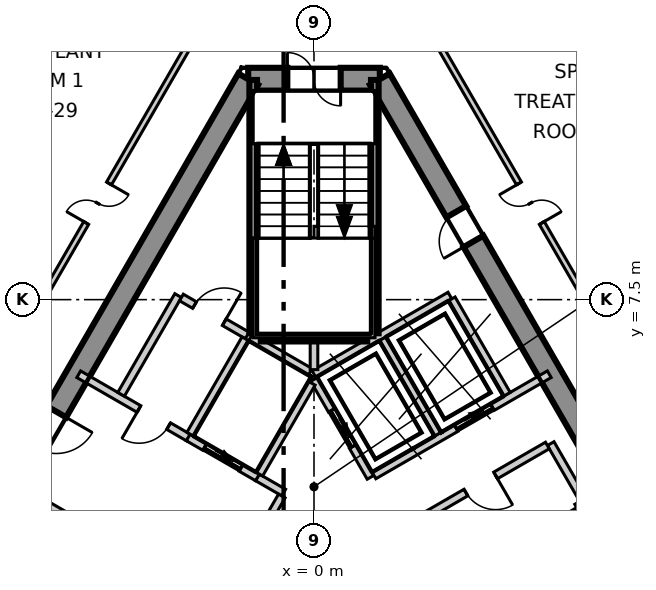
"""IFC4 building model, lengths in metres.
Left out: names, types, materials, properties, quantities, classifications, styles, units other than length and angle.
Written with IfcOpenShell. Run it as: python <this file> out.ifc"""

import sys

from ifc_helpers import new_model, si_unit, direction, frame, frame_2d, origin, place, context, subcontext, project, spatial, polyline, rectangle, outline, extrude, element, fill, save


model = new_model("IFC4")
c1 = context("Model", 3, precision=1e-05, world=origin(), true_north=direction((0.0, 1.0)))
c2 = subcontext(c1, "Body", "Model", "MODEL_VIEW")
j1 = project(units=[si_unit("LENGTHUNIT", "METRE"), si_unit("PLANEANGLEUNIT", "RADIAN")], contexts=[c1])
p1 = place(None, origin())
s1 = spatial("IfcSite", under=j1, at=p1, CompositionType="ELEMENT")
p2 = place(p1, origin())
s2 = spatial("IfcBuilding", under=s1, at=p2, CompositionType="ELEMENT")
p3 = place(p2, frame((0.0, 0.0, 322.3)))
s3 = spatial("IfcBuildingStorey", under=s2, at=p3, CompositionType="ELEMENT", Elevation=322.3)
p4 = place(p3, frame((1.732, 13.3, -0.3), z_axis=(0.0, 0.0, 1.0), x_axis=(-1.0, 0.0, 0.0)))
e1 = element("IfcWall", 1, at=p4, inside=s3, PredefinedType="SHEAR", context=c2, shape_type="SweptSolid", body=[
    extrude(outline(polyline([(-0.173, -0.3), (1.732, -0.3), (3.637, -0.3), (3.291, 0.3), (1.732, 0.3), (0.173, 0.3), (-0.173, -0.3)])), origin(), (0.0, 0.0, 1.0), 5.35),
])
p5 = place(p4, frame((1.032, 0.0, 0.3)))
e2 = element("IfcOpeningElement", 2, at=p5, cuts=e1, PredefinedType="OPENING", context=c2, shape_type="SweptSolid", body=[
    extrude(rectangle(XDim=1.4, YDim=2.1, at=frame_2d((0.7, 1.05))), frame((0.0, 0.31, 0.0), z_axis=(0.0, -1.0, 0.0), x_axis=(1.0, 0.0, 0.0)), (0.0, 0.0, 1.0), 0.62),
])
p6 = place(p3, frame((-1.732, 13.3, -0.3), z_axis=(0.0, 0.0, 1.0), x_axis=(-0.500000539815, -0.866025092122, 0.0)))
e3 = element("IfcWall", 3, at=p6, inside=s3, PredefinedType="SHEAR", context=c2, shape_type="SweptSolid", body=[
    extrude(outline(polyline([(-0.173, -0.3), (1.795, -0.3), (3.763, -0.3), (5.732, -0.3), (7.7, -0.3), (9.668, -0.301), (11.637, -0.301), (13.605, -0.301), (15.573, -0.301), (17.542, -0.301), (19.51, -0.301), (21.478, -0.301), (21.131, 0.3), (19.226, 0.3), (17.321, 0.3), (15.415, 0.3), (13.51, 0.3), (11.605, 0.3), (9.699, 0.3), (7.794, 0.3), (5.889, 0.3), (3.984, 0.3), (2.078, 0.3), (0.173, 0.3), (-0.173, -0.3)])), origin(), (0.0, 0.0, 1.0), 5.35),
])
p7 = place(p6, frame((10.102, 0.0, 0.3)))
e4 = element("IfcOpeningElement", 4, at=p7, cuts=e3, PredefinedType="OPENING", context=c2, shape_type="SweptSolid", body=[
    extrude(rectangle(XDim=1.1, YDim=2.1, at=frame_2d((0.55, 1.05))), frame((0.0, 0.31, 0.0), z_axis=(0.0, -1.0, 0.0), x_axis=(1.0, 0.0, 0.0)), (0.0, 0.0, 1.0), 0.621),
])
p8 = place(p6, frame((16.378, 0.0, 0.3)))
e5 = element("IfcOpeningElement", 5, at=p8, cuts=e3, PredefinedType="OPENING", context=c2, shape_type="SweptSolid", body=[
    extrude(rectangle(XDim=0.9, YDim=2.1, at=frame_2d((0.45, 1.05))), frame((0.0, 0.31, 0.0), z_axis=(0.0, -1.0, 0.0), x_axis=(1.0, 0.0, 0.0)), (0.0, 0.0, 1.0), 0.621),
])
p9 = place(p3, frame((12.384, -5.15, -0.3), z_axis=(0.0, 0.0, 1.0), x_axis=(-0.500000539815, 0.866025092122, 0.0)))
e6 = element("IfcWall", 6, at=p9, inside=s3, PredefinedType="SHEAR", context=c2, shape_type="SweptSolid", body=[
    extrude(outline(polyline([(-0.173, -0.301), (1.795, -0.301), (3.763, -0.301), (5.731, -0.301), (7.7, -0.301), (9.668, -0.301), (11.636, -0.301), (13.604, -0.3), (15.573, -0.3), (17.541, -0.3), (19.509, -0.3), (21.477, -0.3), (21.131, 0.3), (19.226, 0.3), (17.321, 0.3), (15.415, 0.3), (13.51, 0.3), (11.605, 0.3), (9.699, 0.3), (7.794, 0.3), (5.889, 0.3), (3.984, 0.3), (2.078, 0.3), (0.173, 0.3), (-0.173, -0.301)])), origin(), (0.0, 0.0, 1.0), 5.35),
])
p10 = place(p9, frame((16.378, 0.0, 0.3)))
e7 = element("IfcOpeningElement", 7, at=p10, cuts=e6, PredefinedType="OPENING", context=c2, shape_type="SweptSolid", body=[
    extrude(rectangle(XDim=0.9, YDim=2.1, at=frame_2d((0.45, 1.05))), frame((0.0, 0.31, 0.0), z_axis=(0.0, -1.0, 0.0), x_axis=(1.0, 0.0, 0.0)), (0.0, 0.0, 1.0), 0.621),
])
p11 = place(p3, frame((-8.579, 5.04, 0.0), z_axis=(0.0, 0.0, 1.0), x_axis=(0.499960750514, 0.8660480633, 0.0)))
e8 = element("IfcWall", 8, at=p11, inside=s3, PredefinedType="PARTITIONING", context=c2, shape_type="SweptSolid", body=[
    extrude(rectangle(XDim=11.529, YDim=0.15, at=frame_2d((5.765, 0.0))), origin(), (0.0, 0.0, 1.0), 5.05),
])
p12 = place(p11, frame((5.17, 0.0, 0.0)))
e9 = element("IfcOpeningElement", 9, at=p12, cuts=e8, PredefinedType="OPENING", context=c2, shape_type="SweptSolid", body=[
    extrude(rectangle(XDim=1.2, YDim=2.1, at=frame_2d((0.6, 1.05))), frame((0.0, 0.085, 0.0), z_axis=(0.0, -1.0, 0.0), x_axis=(1.0, 0.0, 0.0)), (0.0, 0.0, 1.0), 0.17),
])
p13 = place(p3, frame((2.771, 15.1, 0.0), z_axis=(0.0, 0.0, 1.0), x_axis=(0.500017691629, -0.866015189277, 0.0)))
e10 = element("IfcWall", 10, at=p13, inside=s3, PredefinedType="PARTITIONING", context=c2, shape_type="SweptSolid", body=[
    extrude(rectangle(XDim=23.383, YDim=0.15, at=frame_2d((11.691, 0.0))), origin(), (0.0, 0.0, 1.0), 5.05),
])
p14 = place(p13, frame((14.841, 0.0, 0.0)))
e11 = element("IfcOpeningElement", 11, at=p14, cuts=e10, PredefinedType="OPENING", context=c2, shape_type="SweptSolid", body=[
    extrude(rectangle(XDim=1.0, YDim=2.1, at=frame_2d((0.5, 1.05))), frame((0.0, 0.085, 0.0), z_axis=(0.0, -1.0, 0.0), x_axis=(1.0, 0.0, 0.0)), (0.0, 0.0, 1.0), 0.17),
])
p15 = place(p13, frame((5.246, 0.0, 0.0)))
e12 = element("IfcOpeningElement", 12, at=p15, cuts=e10, PredefinedType="OPENING", context=c2, shape_type="SweptSolid", body=[
    extrude(rectangle(XDim=1.2, YDim=2.1, at=frame_2d((0.6, 1.05))), frame((0.0, 0.085, 0.0), z_axis=(0.0, -1.0, 0.0), x_axis=(1.0, 0.0, 0.0)), (0.0, 0.0, 1.0), 0.17),
])
p16 = place(p3, frame((-0.002, 5.542, 0.0), z_axis=(0.0, 0.0, 1.0), x_axis=(0.866103910842, 0.499863997127, 0.0)))
e13 = element("IfcWall", 13, at=p16, inside=s3, PredefinedType="SOLIDWALL", context=c2, shape_type="SweptSolid", body=[
    extrude(rectangle(XDim=4.131, YDim=0.2, at=frame_2d((2.065, 0.0))), origin(), (0.0, 0.0, 1.0), 5.05),
])
p17 = place(p3, frame((0.0, 5.4, 0.0), z_axis=(0.0, 0.0, 1.0), x_axis=(0.500103862429, -0.865965430478, 0.0)))
e14 = element("IfcWall", 14, at=p17, inside=s3, PredefinedType="SOLIDWALL", context=c2, shape_type="SweptSolid", body=[
    extrude(rectangle(XDim=2.973, YDim=0.2, at=frame_2d((1.487, 0.0))), origin(), (0.0, 0.0, 1.0), 5.05),
])
p18 = place(p17, frame((0.937, 0.0, 0.0)))
e15 = element("IfcOpeningElement", 15, at=p18, cuts=e14, PredefinedType="OPENING", context=c2, shape_type="SweptSolid", body=[
    extrude(rectangle(XDim=1.1, YDim=2.1, at=frame_2d((0.55, 1.05))), frame((0.0, 0.11, 0.0), z_axis=(0.0, -1.0, 0.0), x_axis=(1.0, 0.0, 0.0)), (0.0, 0.0, 1.0), 0.22),
])
p19 = place(p3, frame((1.578, 2.874, 0.0), z_axis=(0.0, 0.0, 1.0), x_axis=(0.866045911672, 0.499964477614, 0.0)))
e16 = element("IfcWall", 16, at=p19, inside=s3, PredefinedType="SOLIDWALL", context=c2, shape_type="SweptSolid", body=[
    extrude(rectangle(XDim=5.327, YDim=0.2, at=frame_2d((2.663, 0.0))), origin(), (0.0, 0.0, 1.0), 5.05),
])
p20 = place(p19, frame((2.496, 0.0, 0.0)))
e17 = element("IfcOpeningElement", 17, at=p20, cuts=e16, PredefinedType="OPENING", context=c2, shape_type="SweptSolid", body=[
    extrude(rectangle(XDim=1.1, YDim=2.1, at=frame_2d((0.55, 1.05))), frame((0.0, 0.11, 0.0), z_axis=(0.0, -1.0, 0.0), x_axis=(1.0, 0.0, 0.0)), (0.0, 0.0, 1.0), 0.22),
])
for number, where, z_axis, x_axis in (
    (18, (3.626, 7.52, 0.0), (0.0, 0.0, 1.0), (0.5, -0.866, 0.0)),
    (19, (1.807, 6.47, 0.0), (0.0, 0.0, 1.0), (0.5, -0.866, 0.0)),
):
    element("IfcWall", number, at=place(p3, frame(where, z_axis=z_axis, x_axis=x_axis)), inside=s3, PredefinedType="SOLIDWALL", context=c2, shape_type="SweptSolid", body=[
        extrude(rectangle(XDim=2.9, YDim=0.2, at=frame_2d((1.45, 0.0))), origin(), (0.0, 0.0, 1.0), 5.05),
    ])
p21 = place(p3, frame((6.229, 3.712, 0.0), z_axis=(0.0, 0.0, 1.0), x_axis=(0.499875724984, -0.86609714211, 0.0)))
e20 = element("IfcWall", 20, at=p21, inside=s3, PredefinedType="SOLIDWALL", context=c2, shape_type="SweptSolid", body=[
    extrude(rectangle(XDim=1.701, YDim=0.2, at=frame_2d((0.85, 0.0))), origin(), (0.0, 0.0, 1.0), 5.05),
])
p22 = place(p3, frame((2.548, 1.587, 0.0), z_axis=(0.0, 0.0, 1.0), x_axis=(0.866004344652, 0.500036473714, 0.0)))
e21 = element("IfcWall", 21, at=p22, inside=s3, PredefinedType="SOLIDWALL", context=c2, shape_type="SweptSolid", body=[
    extrude(rectangle(XDim=4.15, YDim=0.2, at=frame_2d((2.075, 0.0))), origin(), (0.0, 0.0, 1.0), 5.05),
])
p23 = place(p22, frame((1.675, 0.0, 0.0)))
e22 = element("IfcOpeningElement", 22, at=p23, cuts=e21, PredefinedType="OPENING", context=c2, shape_type="SweptSolid", body=[
    extrude(rectangle(XDim=0.9, YDim=2.1, at=frame_2d((0.45, 1.05))), frame((0.0, 0.11, 0.0), z_axis=(0.0, -1.0, 0.0), x_axis=(1.0, 0.0, 0.0)), (0.0, 0.0, 1.0), 0.22),
])
p24 = place(p3, frame((-7.891, 2.593, 0.0), z_axis=(0.0, 0.0, 1.0), x_axis=(0.866070917804, -0.499921159118, 0.0)))
e23 = element("IfcWall", 23, at=p24, inside=s3, PredefinedType="SOLIDWALL", context=c2, shape_type="SweptSolid", body=[
    extrude(rectangle(XDim=3.333, YDim=0.2, at=frame_2d((1.666, 0.0))), origin(), (0.0, 0.0, 1.0), 5.05),
])
p25 = place(p24, frame((1.73, 0.0, 0.0)))
e24 = element("IfcOpeningElement", 24, at=p25, cuts=e23, PredefinedType="OPENING", context=c2, shape_type="SweptSolid", body=[
    extrude(rectangle(XDim=1.1, YDim=2.1, at=frame_2d((0.55, 1.05))), frame((0.0, 0.11, 0.0), z_axis=(0.0, -1.0, 0.0), x_axis=(1.0, 0.0, 0.0)), (0.0, 0.0, 1.0), 0.22),
])
p26 = place(p3, frame((-6.191, 5.537, 0.0), z_axis=(0.0, 0.0, 1.0), x_axis=(0.866052607023, -0.499952879648, 0.0)))
e25 = element("IfcWall", 25, at=p26, inside=s3, PredefinedType="SOLIDWALL", context=c2, shape_type="SweptSolid", body=[
    extrude(rectangle(XDim=3.332, YDim=0.2, at=frame_2d((1.666, 0.0))), origin(), (0.0, 0.0, 1.0), 5.05),
])
p27 = place(p26, frame((1.83, 0.0, 0.0)))
e26 = element("IfcOpeningElement", 26, at=p27, cuts=e25, PredefinedType="OPENING", context=c2, shape_type="SweptSolid", body=[
    extrude(rectangle(XDim=0.9, YDim=2.1, at=frame_2d((0.45, 1.05))), frame((0.0, 0.11, 0.0), z_axis=(0.0, -1.0, 0.0), x_axis=(1.0, 0.0, 0.0)), (0.0, 0.0, 1.0), 0.22),
])
p28 = place(p3, frame((-1.488, 2.822, 0.0), z_axis=(0.0, 0.0, 1.0), x_axis=(0.866236612152, -0.499633997809, 0.0)))
e27 = element("IfcWall", 27, at=p28, inside=s3, PredefinedType="SOLIDWALL", context=c2, shape_type="SweptSolid", body=[
    extrude(rectangle(XDim=0.796, YDim=0.2, at=frame_2d((0.398, 0.0))), origin(), (0.0, 0.0, 1.0), 5.05),
])
p29 = place(p3, frame((-5.076, 5.009, 0.0), z_axis=(0.0, 0.0, 1.0), x_axis=(0.50002537861, 0.866010750942, 0.0)))
e28 = element("IfcWall", 28, at=p29, inside=s3, PredefinedType="SOLIDWALL", context=c2, shape_type="SweptSolid", body=[
    extrude(rectangle(XDim=3.0, YDim=0.2, at=frame_2d((1.5, 0.0))), origin(), (0.0, 0.0, 1.0), 5.05),
])
p30 = place(p3, frame((-3.489, 7.557, 0.0), z_axis=(0.0, 0.0, 1.0), x_axis=(0.866010750942, -0.50002537861, 0.0)))
e29 = element("IfcWall", 29, at=p30, inside=s3, PredefinedType="SOLIDWALL", context=c2, shape_type="SweptSolid", body=[
    extrude(rectangle(XDim=2.0, YDim=0.2, at=frame_2d((1.0, 0.0))), origin(), (0.0, 0.0, 1.0), 5.05),
])
p31 = place(p30, frame((0.401, 0.0, 0.0)))
e30 = element("IfcOpeningElement", 30, at=p31, cuts=e29, PredefinedType="OPENING", context=c2, shape_type="SweptSolid", body=[
    extrude(rectangle(XDim=0.9, YDim=2.1, at=frame_2d((0.45, 1.05))), frame((0.0, 0.11, 0.0), z_axis=(0.0, -1.0, 0.0), x_axis=(1.0, 0.0, 0.0)), (0.0, 0.0, 1.0), 0.22),
])
p32 = place(p3, frame((-2.444, -0.433, 0.0), z_axis=(0.0, 0.0, 1.0), x_axis=(0.500035624827, 0.866004834804, 0.0)))
e31 = element("IfcWall", 31, at=p32, inside=s3, PredefinedType="SOLIDWALL", context=c2, shape_type="SweptSolid", body=[
    extrude(rectangle(XDim=3.194, YDim=0.2, at=frame_2d((1.597, 0.0))), origin(), (0.0, 0.0, 1.0), 5.05),
])
p33 = place(p3, frame((-3.309, 3.873, 0.0), z_axis=(0.0, 0.0, 1.0), x_axis=(0.866098583652, -0.499873227325, 0.0)))
e32 = element("IfcWall", 32, at=p33, inside=s3, PredefinedType="SOLIDWALL", context=c2, shape_type="SweptSolid", body=[
    extrude(rectangle(XDim=2.103, YDim=0.2, at=frame_2d((1.051, 0.0))), origin(), (0.0, 0.0, 1.0), 5.05),
])
p34 = place(p33, frame((0.502, 0.0, 0.0)))
e33 = element("IfcOpeningElement", 33, at=p34, cuts=e32, PredefinedType="OPENING", context=c2, shape_type="SweptSolid", body=[
    extrude(rectangle(XDim=1.1, YDim=2.1, at=frame_2d((0.55, 1.05))), frame((0.0, 0.11, 0.0), z_axis=(0.0, -1.0, 0.0), x_axis=(1.0, 0.0, 0.0)), (0.0, 0.0, 1.0), 0.22),
])
p35 = place(p3, frame((-3.257, 3.959, 0.0), z_axis=(0.0, 0.0, 1.0), x_axis=(0.50012328804, 0.865954211699, 0.0)))
e34 = element("IfcWall", 34, at=p35, inside=s3, PredefinedType="SOLIDWALL", context=c2, shape_type="SweptSolid", body=[
    extrude(rectangle(XDim=2.9, YDim=0.2, at=frame_2d((1.45, 0.0))), origin(), (0.0, 0.0, 1.0), 5.05),
])
p36 = place(p3, frame((-1.67, 6.507, 0.0), z_axis=(0.0, 0.0, 1.0), x_axis=(0.865941441609, -0.500145398563, 0.0)))
e35 = element("IfcWall", 35, at=p36, inside=s3, PredefinedType="SOLIDWALL", context=c2, shape_type="SweptSolid", body=[
    extrude(rectangle(XDim=1.815, YDim=0.2, at=frame_2d((0.908, 0.0))), origin(), (0.0, 0.0, 1.0), 5.05),
])
p37 = place(p3, frame((-1.438, 2.909, 0.0), z_axis=(0.0, 0.0, 1.0), x_axis=(0.499829630636, 0.866123744241, 0.0)))
e36 = element("IfcWall", 36, at=p37, inside=s3, PredefinedType="SOLIDWALL", context=c2, shape_type="SweptSolid", body=[
    extrude(rectangle(XDim=2.761, YDim=0.2, at=frame_2d((1.38, 0.0))), origin(), (0.0, 0.0, 1.0), 5.05),
])
p38 = place(p3, frame((0.0, 5.658, 0.0), z_axis=(0.0, 0.0, 1.0), x_axis=(0.0, 1.0, 0.0)))
e37 = element("IfcWall", 37, at=p38, inside=s3, PredefinedType="SOLIDWALL", context=c2, shape_type="SweptSolid", body=[
    extrude(rectangle(XDim=0.742, YDim=0.2, at=frame_2d((0.371, 0.0))), origin(), (0.0, 0.0, 1.0), 5.05),
])
p39 = place(p3, frame((6.826, 1.978, 0.0), z_axis=(0.0, 0.0, 1.0), x_axis=(0.499990139034, -0.866031096941, 0.0)))
e38 = element("IfcWall", 38, at=p39, inside=s3, PredefinedType="SOLIDWALL", context=c2, shape_type="SweptSolid", body=[
    extrude(rectangle(XDim=3.0, YDim=0.2, at=frame_2d((1.5, 0.0))), origin(), (0.0, 0.0, 1.0), 5.05),
])
p40 = place(p3, frame((6.912, 2.028, 0.0), z_axis=(0.0, 0.0, 1.0), x_axis=(0.866559367082, 0.499074005857, 0.0)))
e39 = element("IfcWall", 39, at=p40, inside=s3, PredefinedType="SOLIDWALL", context=c2, shape_type="SweptSolid", body=[
    extrude(rectangle(XDim=0.152, YDim=0.2, at=frame_2d((0.076, 0.0))), origin(), (0.0, 0.0, 1.0), 5.05),
])
p41 = place(p3, frame((1.6, 6.615, 0.0), z_axis=(0.0, 0.0, 1.0), x_axis=(0.0, 1.0, 0.0)))
e40 = element("IfcWall", 40, at=p41, inside=s3, PredefinedType="SOLIDWALL", context=c2, shape_type="SweptSolid", body=[
    extrude(rectangle(XDim=6.665, YDim=0.2, at=frame_2d((3.333, 0.0))), origin(), (0.0, 0.0, 1.0), 5.05),
])
p42 = place(p3, frame((-1.4, 6.5, 0.0), z_axis=(0.0, 0.0, 1.0), x_axis=(1.0, 0.0, 0.0)))
e41 = element("IfcWall", 41, at=p42, inside=s3, PredefinedType="SOLIDWALL", context=c2, shape_type="SweptSolid", body=[
    extrude(rectangle(XDim=2.8, YDim=0.2, at=frame_2d((1.4, 0.0))), origin(), (0.0, 0.0, 1.0), 5.05),
])
p43 = place(p3, frame((-1.6, 6.615, 0.0), z_axis=(0.0, 0.0, 1.0), x_axis=(0.0, 1.0, 0.0)))
e42 = element("IfcWall", 42, at=p43, inside=s3, PredefinedType="SOLIDWALL", context=c2, shape_type="SweptSolid", body=[
    extrude(rectangle(XDim=6.665, YDim=0.2, at=frame_2d((3.333, 0.0))), origin(), (0.0, 0.0, 1.0), 5.05),
])
p44 = place(p18, origin())
e43 = element("IfcDoor", 43, at=p44, inside=s3, OperationType="SLIDING_TO_LEFT", PredefinedType="DOOR", context=c2, shape_type="SweptSolid", body=[
    extrude(rectangle(XDim=1.1, YDim=2.1, at=frame_2d((0.55, 1.05))), frame((0.0, 0.025, 0.0), z_axis=(0.0, -1.0, 0.0), x_axis=(1.0, 0.0, 0.0)), (0.0, 0.0, 1.0), 0.05),
])
fill(e15, e43)
p45 = place(p20, origin())
e44 = element("IfcDoor", 44, at=p45, inside=s3, OperationType="SLIDING_TO_LEFT", PredefinedType="DOOR", context=c2, shape_type="SweptSolid", body=[
    extrude(rectangle(XDim=1.1, YDim=2.1, at=frame_2d((0.55, 1.05))), frame((0.0, 0.025, 0.0), z_axis=(0.0, -1.0, 0.0), x_axis=(1.0, 0.0, 0.0)), (0.0, 0.0, 1.0), 0.05),
])
fill(e17, e44)
p46 = place(p34, origin())
e45 = element("IfcDoor", 45, at=p46, inside=s3, OperationType="SLIDING_TO_LEFT", PredefinedType="DOOR", context=c2, shape_type="SweptSolid", body=[
    extrude(rectangle(XDim=1.1, YDim=2.1, at=frame_2d((0.55, 1.05))), frame((0.0, 0.025, 0.0), z_axis=(0.0, -1.0, 0.0), x_axis=(1.0, 0.0, 0.0)), (0.0, 0.0, 1.0), 0.05),
])
fill(e33, e45)
p47 = place(p27, origin())
e46 = element("IfcDoor", 46, at=p47, inside=s3, OperationType="SINGLE_SWING_LEFT", PredefinedType="DOOR", context=c2, shape_type="SweptSolid", body=[
    extrude(rectangle(XDim=0.9, YDim=2.1, at=frame_2d((0.45, 1.05))), frame((0.0, 0.025, 0.0), z_axis=(0.0, -1.0, 0.0), x_axis=(1.0, 0.0, 0.0)), (0.0, 0.0, 1.0), 0.05),
])
fill(e26, e46)
p48 = place(p15, origin())
e47 = element("IfcDoor", 47, at=p48, inside=s3, OperationType="DOUBLE_DOOR_SINGLE_SWING", PredefinedType="DOOR", context=c2, shape_type="SweptSolid", body=[
    extrude(rectangle(XDim=1.2, YDim=2.1, at=frame_2d((0.6, 1.05))), frame((0.0, 0.025, 0.0), z_axis=(0.0, -1.0, 0.0), x_axis=(1.0, 0.0, 0.0)), (0.0, 0.0, 1.0), 0.05),
])
fill(e12, e47)
p49 = place(p12, origin())
e48 = element("IfcDoor", 48, at=p49, inside=s3, OperationType="DOUBLE_DOOR_SINGLE_SWING", PredefinedType="DOOR", context=c2, shape_type="SweptSolid", body=[
    extrude(rectangle(XDim=1.2, YDim=2.1, at=frame_2d((0.6, 1.05))), frame((0.0, 0.025, 0.0), z_axis=(0.0, -1.0, 0.0), x_axis=(1.0, 0.0, 0.0)), (0.0, 0.0, 1.0), 0.05),
])
fill(e9, e48)
p50 = place(p5, origin())
e49 = element("IfcDoor", 49, at=p50, inside=s3, OperationType="DOUBLE_DOOR_SINGLE_SWING", PredefinedType="DOOR", context=c2, shape_type="SweptSolid", body=[
    extrude(rectangle(XDim=1.4, YDim=2.1, at=frame_2d((0.7, 1.05))), frame((0.0, 0.025, 0.0), z_axis=(0.0, -1.0, 0.0), x_axis=(1.0, 0.0, 0.0)), (0.0, 0.0, 1.0), 0.05),
])
fill(e2, e49)
p51 = place(p7, origin())
e50 = element("IfcDoor", 50, at=p51, inside=s3, OperationType="SINGLE_SWING_RIGHT", PredefinedType="DOOR", context=c2, shape_type="SweptSolid", body=[
    extrude(rectangle(XDim=1.1, YDim=2.1, at=frame_2d((0.55, 1.05))), frame((0.0, 0.025, 0.0), z_axis=(0.0, -1.0, 0.0), x_axis=(1.0, 0.0, 0.0)), (0.0, 0.0, 1.0), 0.05),
])
fill(e4, e50)
p52 = place(p31, origin())
e51 = element("IfcDoor", 51, at=p52, inside=s3, OperationType="SINGLE_SWING_LEFT", PredefinedType="DOOR", context=c2, shape_type="SweptSolid", body=[
    extrude(rectangle(XDim=0.9, YDim=2.1, at=frame_2d((0.45, 1.05))), frame((0.0, 0.025, 0.0), z_axis=(0.0, -1.0, 0.0), x_axis=(1.0, 0.0, 0.0)), (0.0, 0.0, 1.0), 0.05),
])
fill(e30, e51)
p53 = place(p10, origin())
e52 = element("IfcDoor", 52, at=p53, inside=s3, OperationType="SINGLE_SWING_RIGHT", PredefinedType="DOOR", context=c2, shape_type="SweptSolid", body=[
    extrude(rectangle(XDim=0.9, YDim=2.1, at=frame_2d((0.45, 1.05))), frame((0.0, 0.025, 0.0), z_axis=(0.0, -1.0, 0.0), x_axis=(1.0, 0.0, 0.0)), (0.0, 0.0, 1.0), 0.05),
])
fill(e7, e52)
p54 = place(p23, origin())
e53 = element("IfcDoor", 53, at=p54, inside=s3, OperationType="SINGLE_SWING_RIGHT", PredefinedType="DOOR", context=c2, shape_type="SweptSolid", body=[
    extrude(rectangle(XDim=0.9, YDim=2.1, at=frame_2d((0.45, 1.05))), frame((0.0, 0.025, 0.0), z_axis=(0.0, -1.0, 0.0), x_axis=(1.0, 0.0, 0.0)), (0.0, 0.0, 1.0), 0.05),
])
fill(e22, e53)
save(model, sys.argv[1])
